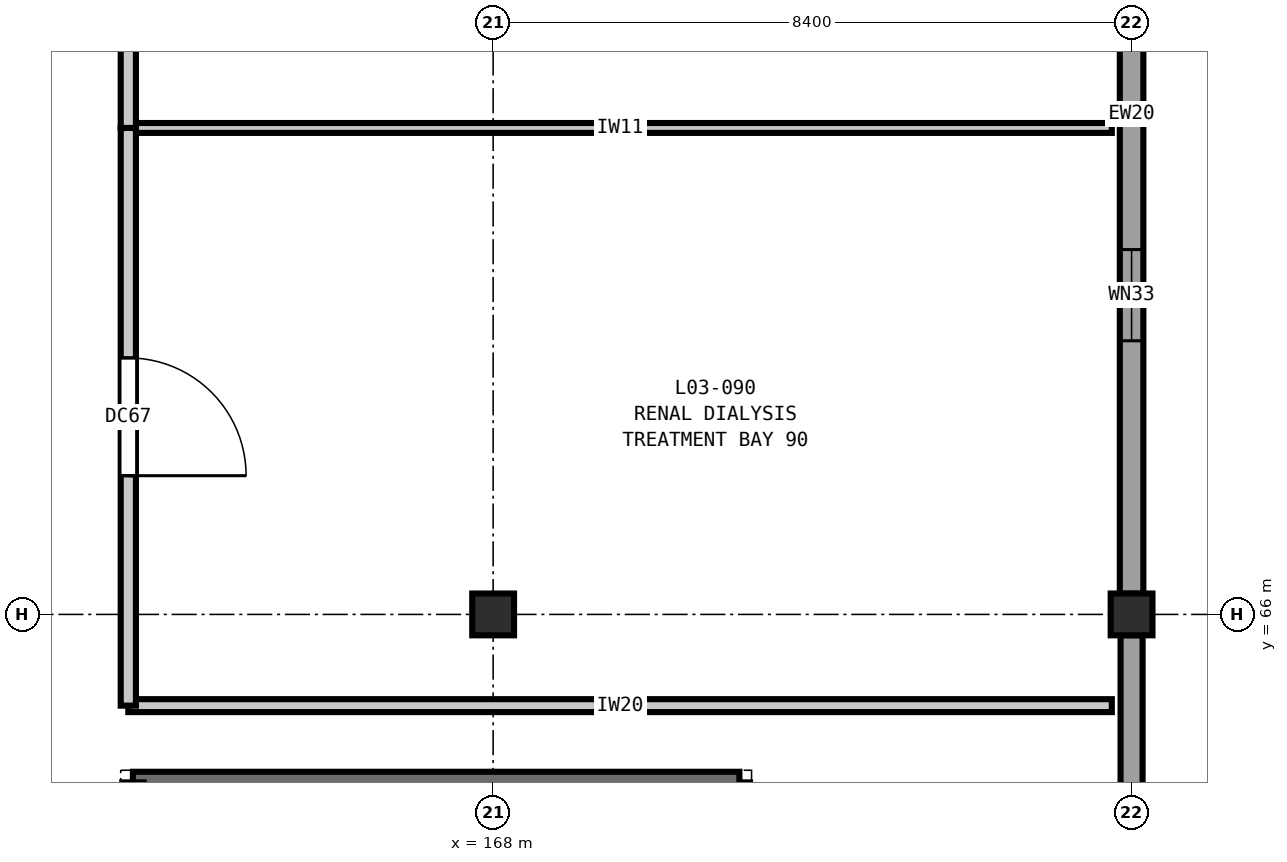
"""IFC4 building model, lengths in metres.
Left out: names, types, materials, properties, quantities, classifications, styles, units other than length and angle.
Written with IfcOpenShell. Run it as: python <this file> out.ifc"""

import sys

from ifc_helpers import new_model, si_unit, direction, frame, frame_2d, origin, origin_2d, place, context, subcontext, project, spatial, rectangle, extrude, element, fill, save


model = new_model("IFC4")
c1 = context("Model", 3, precision=1e-05, world=origin(), true_north=direction((0.0, 1.0)))
c2 = subcontext(c1, "Body", "Model", "MODEL_VIEW")
j1 = project(units=[si_unit("LENGTHUNIT", "METRE"), si_unit("PLANEANGLEUNIT", "RADIAN")], contexts=[c1])
p1 = place(None, origin())
s1 = spatial("IfcSite", under=j1, at=p1, CompositionType="ELEMENT")
p2 = place(p1, origin())
s2 = spatial("IfcBuilding", under=s1, at=p2, CompositionType="ELEMENT")
p3 = place(p2, frame((0.0, 0.0, 16.2)))
s3 = spatial("IfcBuildingStorey", under=s2, at=p3, CompositionType="ELEMENT", Elevation=16.2)
for number, where, z_axis, x_axis in (
    (1, (168.0, 66.0, 0.0), (0.0, 0.0, 1.0), (1.0, 0.0, 0.0)),
    (2, (176.4, 66.0, 0.0), (0.0, 0.0, 1.0), (1.0, 0.0, 0.0)),
):
    element("IfcColumn", number, at=place(p3, frame(where, z_axis=z_axis, x_axis=x_axis)), inside=s3, PredefinedType="COLUMN", context=c2, shape_type="SweptSolid", body=[
        extrude(rectangle(XDim=0.55, YDim=0.55, at=origin_2d()), origin(), (0.0, 0.0, 1.0), 4.2),
    ])
p4 = place(p3, frame((176.4, 74.127, 0.0), z_axis=(0.0, 0.0, 1.0), x_axis=(0.0, -1.0, 0.0)))
e3 = element("IfcWall", 3, at=p4, inside=s3, PredefinedType="SOLIDWALL", context=c2, shape_type="SweptSolid", body=[
    extrude(rectangle(XDim=7.854, YDim=0.31, at=frame_2d((3.927, 0.0))), origin(), (0.0, 0.0, 1.0), 3.48),
])
p5 = place(p4, frame((3.327, 0.0, 0.9)))
e4 = element("IfcOpeningElement", 4, at=p5, cuts=e3, PredefinedType="OPENING", context=c2, shape_type="SweptSolid", body=[
    extrude(rectangle(XDim=1.2, YDim=1.55, at=frame_2d((0.6, 0.775))), frame((0.0, 0.165, 0.0), z_axis=(0.0, -1.0, 0.0), x_axis=(1.0, 0.0, 0.0)), (0.0, 0.0, 1.0), 0.33),
])
p6 = place(p3, frame((176.4, 65.727, 0.0), z_axis=(0.0, 0.0, 1.0), x_axis=(0.0, -1.0, 0.0)))
e5 = element("IfcWall", 5, at=p6, inside=s3, PredefinedType="SOLIDWALL", context=c2, shape_type="SweptSolid", body=[
    extrude(rectangle(XDim=7.854, YDim=0.29, at=frame_2d((3.927, 0.0))), origin(), (0.0, 0.0, 1.0), 3.48),
])
p7 = place(p6, frame((3.252, 0.0, 0.9)))
e6 = element("IfcOpeningElement", 6, at=p7, cuts=e5, PredefinedType="OPENING", context=c2, shape_type="SweptSolid", body=[
    extrude(rectangle(XDim=1.35, YDim=1.55, at=frame_2d((0.675, 0.775))), frame((0.0, 0.155, 0.0), z_axis=(0.0, -1.0, 0.0), x_axis=(1.0, 0.0, 0.0)), (0.0, 0.0, 1.0), 0.31),
])
p8 = place(p3, frame((171.24, 63.79, 0.0), z_axis=(0.0, 0.0, 1.0), x_axis=(-1.0, 0.0, 0.0)))
e7 = element("IfcWall", 7, at=p8, inside=s3, PredefinedType="SHEAR", context=c2, shape_type="SweptSolid", body=[
    extrude(rectangle(XDim=7.98, YDim=0.28, at=frame_2d((3.99, 0.0))), origin(), (0.0, 0.0, 1.0), 4.2),
])
p9 = place(p3, frame((163.2, 64.8, 0.0), z_axis=(0.0, 0.0, 1.0), x_axis=(1.0, 0.0, 0.0)))
e8 = element("IfcWall", 8, at=p9, inside=s3, PredefinedType="PARTITIONING", context=c2, shape_type="SweptSolid", body=[
    extrude(rectangle(XDim=12.94, YDim=0.17, at=frame_2d((6.47, 0.0))), origin(), (0.0, 0.0, 1.0), 3.89),
])
p10 = place(p3, frame((163.2, 72.4, 0.0), z_axis=(0.0, 0.0, 1.0), x_axis=(1.0, 0.0, 0.0)))
e9 = element("IfcWall", 9, at=p10, inside=s3, PredefinedType="PARTITIONING", context=c2, shape_type="SweptSolid", body=[
    extrude(rectangle(XDim=12.94, YDim=0.13, at=frame_2d((6.47, 0.0))), origin(), (0.0, 0.0, 1.0), 3.89),
])
p11 = place(p3, frame((163.2, 64.8, 0.0), z_axis=(0.0, 0.0, 1.0), x_axis=(0.0, 1.0, 0.0)))
e10 = element("IfcWall", 10, at=p11, inside=s3, PredefinedType="PARTITIONING", context=c2, shape_type="SweptSolid", body=[
    extrude(rectangle(XDim=7.6, YDim=0.2, at=frame_2d((3.8, 0.0))), origin(), (0.0, 0.0, 1.0), 3.89),
])
p12 = place(p11, frame((3.025, 0.0, 0.0)))
e11 = element("IfcOpeningElement", 11, at=p12, cuts=e10, PredefinedType="OPENING", context=c2, shape_type="SweptSolid", body=[
    extrude(rectangle(XDim=1.55, YDim=2.25, at=frame_2d((0.775, 1.125))), frame((0.0, 0.11, 0.0), z_axis=(0.0, -1.0, 0.0), x_axis=(1.0, 0.0, 0.0)), (0.0, 0.0, 1.0), 0.22),
])
p13 = place(p3, frame((163.2, 72.4, 0.0), z_axis=(0.0, 0.0, 1.0), x_axis=(0.0, 1.0, 0.0)))
e12 = element("IfcWall", 12, at=p13, inside=s3, PredefinedType="PARTITIONING", context=c2, shape_type="SweptSolid", body=[
    extrude(rectangle(XDim=10.4, YDim=0.2, at=frame_2d((5.2, 0.0))), origin(), (0.0, 0.0, 1.0), 3.89),
])
p14 = place(p13, frame((4.35, 0.0, 0.0)))
e13 = element("IfcOpeningElement", 13, at=p14, cuts=e12, PredefinedType="OPENING", context=c2, shape_type="SweptSolid", body=[
    extrude(rectangle(XDim=1.7, YDim=2.3, at=frame_2d((0.85, 1.15))), frame((0.0, 0.11, 0.0), z_axis=(0.0, -1.0, 0.0), x_axis=(1.0, 0.0, 0.0)), (0.0, 0.0, 1.0), 0.22),
])
p15 = place(p5, origin())
e14 = element("IfcWindow", 14, at=p15, inside=s3, PartitioningType="SINGLE_PANEL", PredefinedType="WINDOW", context=c2, shape_type="SweptSolid", body=[
    extrude(rectangle(XDim=1.2, YDim=1.55, at=frame_2d((0.6, 0.775))), frame((0.0, 0.03, 0.0), z_axis=(0.0, -1.0, 0.0), x_axis=(1.0, 0.0, 0.0)), (0.0, 0.0, 1.0), 0.06),
])
fill(e4, e14)
p16 = place(p12, frame((1.55, 0.0, 0.0), z_axis=(0.0, 0.0, 1.0), x_axis=(-1.0, 0.0, 0.0)))
e15 = element("IfcDoor", 15, at=p16, inside=s3, OperationType="SINGLE_SWING_RIGHT", PredefinedType="DOOR", context=c2, shape_type="SweptSolid", body=[
    extrude(rectangle(XDim=1.55, YDim=2.25, at=frame_2d((0.775, 1.125))), frame((0.0, 0.025, 0.0), z_axis=(0.0, -1.0, 0.0), x_axis=(1.0, 0.0, 0.0)), (0.0, 0.0, 1.0), 0.05),
])
fill(e11, e15)
save(model, sys.argv[1])
